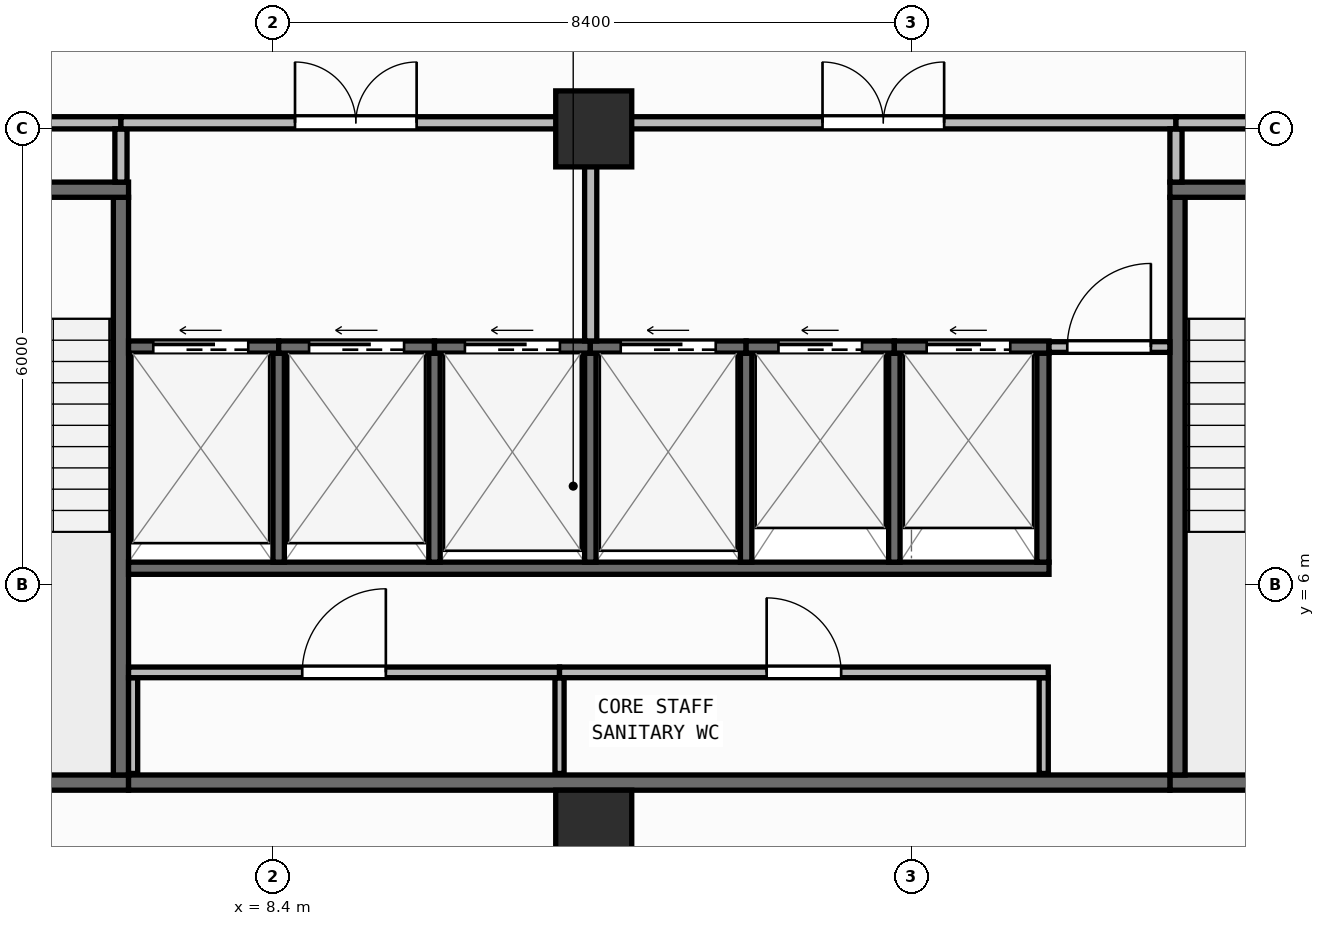
"""IFC4 building model, lengths in metres.
Left out: names, types, materials, properties, quantities, classifications, styles, units other than length and angle.
Written with IfcOpenShell. Run it as: python <this file> out.ifc"""

import sys

from ifc_helpers import new_model, si_unit, direction, frame, frame_2d, origin, origin_2d, place, context, subcontext, project, spatial, rectangle, extrude, element, fill, save


model = new_model("IFC4")
c1 = context("Model", 3, precision=1e-05, world=origin(), true_north=direction((0.0, 1.0)))
c2 = subcontext(c1, "Body", "Model", "MODEL_VIEW")
j1 = project(units=[si_unit("LENGTHUNIT", "METRE"), si_unit("PLANEANGLEUNIT", "RADIAN")], contexts=[c1])
p1 = place(None, origin())
s1 = spatial("IfcSite", under=j1, at=p1, CompositionType="ELEMENT")
p2 = place(p1, origin())
s2 = spatial("IfcBuilding", under=s1, at=p2, CompositionType="ELEMENT")
p3 = place(p2, frame((0.0, 0.0, 207.9)))
s3 = spatial("IfcBuildingStorey", under=s2, at=p3, CompositionType="ELEMENT", Elevation=207.9)
for number, where, z_axis, x_axis in (
    (1, (12.62, 2.8, 0.0), (0.0, 0.0, 1.0), (1.0, 0.0, 0.0)),
    (2, (12.62, 12.0, 0.0), (0.0, 0.0, 1.0), (1.0, 0.0, 0.0)),
):
    element("IfcColumn", number, at=place(p3, frame(where, z_axis=z_axis, x_axis=x_axis)), inside=s3, PredefinedType="COLUMN", context=c2, shape_type="SweptSolid", body=[
        extrude(rectangle(XDim=1.0, YDim=1.0, at=origin_2d()), origin(), (0.0, 0.0, 1.0), 3.95),
    ])
p4 = place(p3, frame((2.66, 0.174, 0.0), z_axis=(0.0, 0.0, 1.0), x_axis=(0.996634028439, 0.081979347142, 0.0)))
e3 = element("IfcWall", 3, at=p4, inside=s3, PredefinedType="STANDARD", context=c2, shape_type="SweptSolid", body=[
    extrude(rectangle(XDim=46.035, YDim=0.26, at=frame_2d((23.018, 0.0))), origin(), (0.0, 0.0, 1.0), 3.71),
])
p5 = place(p4, frame((21.817, 0.0, 0.9)))
e4 = element("IfcOpeningElement", 4, at=p5, cuts=e3, PredefinedType="OPENING", context=c2, shape_type="SweptSolid", body=[
    extrude(rectangle(XDim=2.4, YDim=1.65, at=frame_2d((1.2, 0.825))), frame((0.0, 0.14, 0.0), z_axis=(0.0, -1.0, 0.0), x_axis=(1.0, 0.0, 0.0)), (0.0, 0.0, 1.0), 0.28),
])
p6 = place(p3, frame((2.8, 3.4, 0.0), z_axis=(0.0, 0.0, 1.0), x_axis=(1.0, 0.0, 0.0)))
e5 = element("IfcWall", 5, at=p6, inside=s3, PredefinedType="SHEAR", context=c2, shape_type="SweptSolid", body=[
    extrude(rectangle(XDim=3.7, YDim=0.2, at=frame_2d((1.85, 0.0))), origin(), (0.0, 0.0, 1.0), 3.71),
])
p7 = place(p3, frame((6.4, 3.5, 0.0), z_axis=(0.0, 0.0, 1.0), x_axis=(0.0, 1.0, 0.0)))
e6 = element("IfcWall", 6, at=p7, inside=s3, PredefinedType="SHEAR", context=c2, shape_type="SweptSolid", body=[
    extrude(rectangle(XDim=7.6, YDim=0.2, at=frame_2d((3.8, 0.0))), origin(), (0.0, 0.0, 1.0), 3.71),
])
p8 = place(p3, frame((2.8, 11.2, 0.0), z_axis=(0.0, 0.0, 1.0), x_axis=(1.0, 0.0, 0.0)))
e7 = element("IfcWall", 7, at=p8, inside=s3, PredefinedType="SHEAR", context=c2, shape_type="SweptSolid", body=[
    extrude(rectangle(XDim=3.7, YDim=0.2, at=frame_2d((1.85, 0.0))), origin(), (0.0, 0.0, 1.0), 3.71),
])
p9 = place(p8, frame((1.2, 0.0, 0.0)))
e8 = element("IfcOpeningElement", 8, at=p9, cuts=e7, PredefinedType="OPENING", context=c2, shape_type="SweptSolid", body=[
    extrude(rectangle(XDim=1.3, YDim=2.15, at=frame_2d((0.65, 1.075))), frame((0.0, 0.11, 0.0), z_axis=(0.0, -1.0, 0.0), x_axis=(1.0, 0.0, 0.0)), (0.0, 0.0, 1.0), 0.22),
])
p10 = place(p3, frame((20.2, 3.4, 0.0), z_axis=(0.0, 0.0, 1.0), x_axis=(1.0, 0.0, 0.0)))
e9 = element("IfcWall", 9, at=p10, inside=s3, PredefinedType="SHEAR", context=c2, shape_type="SweptSolid", body=[
    extrude(rectangle(XDim=3.7, YDim=0.2, at=frame_2d((1.85, 0.0))), origin(), (0.0, 0.0, 1.0), 3.71),
])
p11 = place(p3, frame((20.3, 3.5, 0.0), z_axis=(0.0, 0.0, 1.0), x_axis=(0.0, 1.0, 0.0)))
e10 = element("IfcWall", 10, at=p11, inside=s3, PredefinedType="SHEAR", context=c2, shape_type="SweptSolid", body=[
    extrude(rectangle(XDim=7.6, YDim=0.2, at=frame_2d((3.8, 0.0))), origin(), (0.0, 0.0, 1.0), 3.71),
])
p12 = place(p3, frame((20.2, 11.2, 0.0), z_axis=(0.0, 0.0, 1.0), x_axis=(1.0, 0.0, 0.0)))
e11 = element("IfcWall", 11, at=p12, inside=s3, PredefinedType="SHEAR", context=c2, shape_type="SweptSolid", body=[
    extrude(rectangle(XDim=3.7, YDim=0.2, at=frame_2d((1.85, 0.0))), origin(), (0.0, 0.0, 1.0), 3.71),
])
p13 = place(p12, frame((1.2, 0.0, 0.0)))
e12 = element("IfcOpeningElement", 12, at=p13, cuts=e11, PredefinedType="OPENING", context=c2, shape_type="SweptSolid", body=[
    extrude(rectangle(XDim=1.3, YDim=2.15, at=frame_2d((0.65, 1.075))), frame((0.0, 0.11, 0.0), z_axis=(0.0, -1.0, 0.0), x_axis=(1.0, 0.0, 0.0)), (0.0, 0.0, 1.0), 0.22),
])
p14 = place(p3, frame((6.5, 3.4, 0.0), z_axis=(0.0, 0.0, 1.0), x_axis=(1.0, 0.0, 0.0)))
e13 = element("IfcWall", 13, at=p14, inside=s3, PredefinedType="SHEAR", context=c2, shape_type="SweptSolid", body=[
    extrude(rectangle(XDim=13.7, YDim=0.2, at=frame_2d((6.85, 0.0))), origin(), (0.0, 0.0, 1.0), 3.71),
])
p15 = place(p3, frame((6.5, 6.22, 0.0), z_axis=(0.0, 0.0, 1.0), x_axis=(1.0, 0.0, 0.0)))
e14 = element("IfcWall", 14, at=p15, inside=s3, PredefinedType="SHEAR", context=c2, shape_type="SweptSolid", body=[
    extrude(rectangle(XDim=12.11, YDim=0.16, at=frame_2d((6.055, 0.0))), origin(), (0.0, 0.0, 1.0), 3.71),
])
p16 = place(p3, frame((18.53, 6.3, 0.0), z_axis=(0.0, 0.0, 1.0), x_axis=(0.0, 1.0, 0.0)))
e15 = element("IfcWall", 15, at=p16, inside=s3, PredefinedType="SHEAR", context=c2, shape_type="SweptSolid", body=[
    extrude(rectangle(XDim=2.75, YDim=0.16, at=frame_2d((1.375, 0.0))), origin(), (0.0, 0.0, 1.0), 3.71),
])
for number, where, z_axis, x_axis in (
    (16, (8.475, 6.3, 0.0), (0.0, 0.0, 1.0), (0.0, 1.0, 0.0)),
    (17, (10.525, 6.3, 0.0), (0.0, 0.0, 1.0), (0.0, 1.0, 0.0)),
    (18, (12.575, 6.3, 0.0), (0.0, 0.0, 1.0), (0.0, 1.0, 0.0)),
    (19, (14.625, 6.3, 0.0), (0.0, 0.0, 1.0), (0.0, 1.0, 0.0)),
    (20, (16.575, 6.3, 0.0), (0.0, 0.0, 1.0), (0.0, 1.0, 0.0)),
):
    element("IfcWall", number, at=place(p3, frame(where, z_axis=z_axis, x_axis=x_axis)), inside=s3, PredefinedType="SHEAR", context=c2, shape_type="SweptSolid", body=[
        extrude(rectangle(XDim=2.75, YDim=0.15, at=frame_2d((1.375, 0.0))), origin(), (0.0, 0.0, 1.0), 3.71),
    ])
p17 = place(p3, frame((6.5, 9.13, 0.0), z_axis=(0.0, 0.0, 1.0), x_axis=(1.0, 0.0, 0.0)))
e21 = element("IfcWall", 21, at=p17, inside=s3, PredefinedType="SHEAR", context=c2, shape_type="SweptSolid", body=[
    extrude(rectangle(XDim=1.975, YDim=0.16, at=frame_2d((0.988, 0.0))), origin(), (0.0, 0.0, 1.0), 3.71),
])
p18 = place(p17, frame((0.325, 0.0, 0.0)))
e22 = element("IfcOpeningElement", 22, at=p18, cuts=e21, PredefinedType="OPENING", context=c2, shape_type="SweptSolid", body=[
    extrude(rectangle(XDim=1.25, YDim=2.15, at=frame_2d((0.625, 1.075))), frame((0.0, 0.09, 0.0), z_axis=(0.0, -1.0, 0.0), x_axis=(1.0, 0.0, 0.0)), (0.0, 0.0, 1.0), 0.18),
])
p19 = place(p3, frame((8.475, 9.13, 0.0), z_axis=(0.0, 0.0, 1.0), x_axis=(1.0, 0.0, 0.0)))
e23 = element("IfcWall", 23, at=p19, inside=s3, PredefinedType="SHEAR", context=c2, shape_type="SweptSolid", body=[
    extrude(rectangle(XDim=2.05, YDim=0.16, at=frame_2d((1.025, 0.0))), origin(), (0.0, 0.0, 1.0), 3.71),
])
p20 = place(p19, frame((0.4, 0.0, 0.0)))
e24 = element("IfcOpeningElement", 24, at=p20, cuts=e23, PredefinedType="OPENING", context=c2, shape_type="SweptSolid", body=[
    extrude(rectangle(XDim=1.25, YDim=2.15, at=frame_2d((0.625, 1.075))), frame((0.0, 0.09, 0.0), z_axis=(0.0, -1.0, 0.0), x_axis=(1.0, 0.0, 0.0)), (0.0, 0.0, 1.0), 0.18),
])
p21 = place(p3, frame((10.525, 9.13, 0.0), z_axis=(0.0, 0.0, 1.0), x_axis=(1.0, 0.0, 0.0)))
e25 = element("IfcWall", 25, at=p21, inside=s3, PredefinedType="SHEAR", context=c2, shape_type="SweptSolid", body=[
    extrude(rectangle(XDim=2.05, YDim=0.16, at=frame_2d((1.025, 0.0))), origin(), (0.0, 0.0, 1.0), 3.71),
])
p22 = place(p21, frame((0.4, 0.0, 0.0)))
e26 = element("IfcOpeningElement", 26, at=p22, cuts=e25, PredefinedType="OPENING", context=c2, shape_type="SweptSolid", body=[
    extrude(rectangle(XDim=1.25, YDim=2.15, at=frame_2d((0.625, 1.075))), frame((0.0, 0.09, 0.0), z_axis=(0.0, -1.0, 0.0), x_axis=(1.0, 0.0, 0.0)), (0.0, 0.0, 1.0), 0.18),
])
p23 = place(p3, frame((12.575, 9.13, 0.0), z_axis=(0.0, 0.0, 1.0), x_axis=(1.0, 0.0, 0.0)))
e27 = element("IfcWall", 27, at=p23, inside=s3, PredefinedType="SHEAR", context=c2, shape_type="SweptSolid", body=[
    extrude(rectangle(XDim=2.05, YDim=0.16, at=frame_2d((1.025, 0.0))), origin(), (0.0, 0.0, 1.0), 3.71),
])
p24 = place(p23, frame((0.4, 0.0, 0.0)))
e28 = element("IfcOpeningElement", 28, at=p24, cuts=e27, PredefinedType="OPENING", context=c2, shape_type="SweptSolid", body=[
    extrude(rectangle(XDim=1.25, YDim=2.15, at=frame_2d((0.625, 1.075))), frame((0.0, 0.09, 0.0), z_axis=(0.0, -1.0, 0.0), x_axis=(1.0, 0.0, 0.0)), (0.0, 0.0, 1.0), 0.18),
])
p25 = place(p3, frame((14.625, 9.13, 0.0), z_axis=(0.0, 0.0, 1.0), x_axis=(1.0, 0.0, 0.0)))
e29 = element("IfcWall", 29, at=p25, inside=s3, PredefinedType="SHEAR", context=c2, shape_type="SweptSolid", body=[
    extrude(rectangle(XDim=1.95, YDim=0.16, at=frame_2d((0.975, 0.0))), origin(), (0.0, 0.0, 1.0), 3.71),
])
p26 = place(p25, frame((0.425, 0.0, 0.0)))
e30 = element("IfcOpeningElement", 30, at=p26, cuts=e29, PredefinedType="OPENING", context=c2, shape_type="SweptSolid", body=[
    extrude(rectangle(XDim=1.1, YDim=2.15, at=frame_2d((0.55, 1.075))), frame((0.0, 0.09, 0.0), z_axis=(0.0, -1.0, 0.0), x_axis=(1.0, 0.0, 0.0)), (0.0, 0.0, 1.0), 0.18),
])
p27 = place(p3, frame((16.575, 9.13, 0.0), z_axis=(0.0, 0.0, 1.0), x_axis=(1.0, 0.0, 0.0)))
e31 = element("IfcWall", 31, at=p27, inside=s3, PredefinedType="SHEAR", context=c2, shape_type="SweptSolid", body=[
    extrude(rectangle(XDim=2.035, YDim=0.16, at=frame_2d((1.018, 0.0))), origin(), (0.0, 0.0, 1.0), 3.71),
])
p28 = place(p27, frame((0.425, 0.0, 0.0)))
e32 = element("IfcOpeningElement", 32, at=p28, cuts=e31, PredefinedType="OPENING", context=c2, shape_type="SweptSolid", body=[
    extrude(rectangle(XDim=1.1, YDim=2.15, at=frame_2d((0.55, 1.075))), frame((0.0, 0.09, 0.0), z_axis=(0.0, -1.0, 0.0), x_axis=(1.0, 0.0, 0.0)), (0.0, 0.0, 1.0), 0.18),
])
for number, where, z_axis, x_axis in (
    (33, (6.56, 3.52, 0.0), (0.0, 0.0, 1.0), (0.0, 1.0, 0.0)),
    (34, (12.17, 3.52, 0.0), (0.0, 0.0, 1.0), (0.0, 1.0, 0.0)),
    (35, (18.54, 3.52, 0.0), (0.0, 0.0, 1.0), (0.0, 1.0, 0.0)),
):
    element("IfcWall", number, at=place(p3, frame(where, z_axis=z_axis, x_axis=x_axis)), inside=s3, PredefinedType="PARTITIONING", context=c2, shape_type="SweptSolid", body=[
        extrude(rectangle(XDim=1.26, YDim=0.12, at=frame_2d((0.63, 0.0))), origin(), (0.0, 0.0, 1.0), 3.71),
    ])
p29 = place(p3, frame((6.5, 4.85, 0.0), z_axis=(0.0, 0.0, 1.0), x_axis=(1.0, 0.0, 0.0)))
e36 = element("IfcWall", 36, at=p29, inside=s3, PredefinedType="PARTITIONING", context=c2, shape_type="SweptSolid", body=[
    extrude(rectangle(XDim=5.67, YDim=0.14, at=frame_2d((2.835, 0.0))), origin(), (0.0, 0.0, 1.0), 3.71),
])
p30 = place(p29, frame((2.285, 0.0, 0.0)))
e37 = element("IfcOpeningElement", 37, at=p30, cuts=e36, PredefinedType="OPENING", context=c2, shape_type="SweptSolid", body=[
    extrude(rectangle(XDim=1.1, YDim=2.1, at=frame_2d((0.55, 1.05))), frame((0.0, 0.08, 0.0), z_axis=(0.0, -1.0, 0.0), x_axis=(1.0, 0.0, 0.0)), (0.0, 0.0, 1.0), 0.16),
])
p31 = place(p3, frame((12.17, 4.85, 0.0), z_axis=(0.0, 0.0, 1.0), x_axis=(1.0, 0.0, 0.0)))
e38 = element("IfcWall", 38, at=p31, inside=s3, PredefinedType="PARTITIONING", context=c2, shape_type="SweptSolid", body=[
    extrude(rectangle(XDim=6.43, YDim=0.14, at=frame_2d((3.215, 0.0))), origin(), (0.0, 0.0, 1.0), 3.71),
])
p32 = place(p31, frame((2.725, 0.0, 0.0)))
e39 = element("IfcOpeningElement", 39, at=p32, cuts=e38, PredefinedType="OPENING", context=c2, shape_type="SweptSolid", body=[
    extrude(rectangle(XDim=0.98, YDim=2.1, at=frame_2d((0.49, 1.05))), frame((0.0, 0.08, 0.0), z_axis=(0.0, -1.0, 0.0), x_axis=(1.0, 0.0, 0.0)), (0.0, 0.0, 1.0), 0.16),
])
p33 = place(p3, frame((18.61, 9.13, 0.0), z_axis=(0.0, 0.0, 1.0), x_axis=(1.0, 0.0, 0.0)))
e40 = element("IfcWall", 40, at=p33, inside=s3, PredefinedType="PARTITIONING", context=c2, shape_type="SweptSolid", body=[
    extrude(rectangle(XDim=1.59, YDim=0.14, at=frame_2d((0.795, 0.0))), origin(), (0.0, 0.0, 1.0), 3.71),
])
p34 = place(p33, frame((0.24, 0.0, 0.0)))
e41 = element("IfcOpeningElement", 41, at=p34, cuts=e40, PredefinedType="OPENING", context=c2, shape_type="SweptSolid", body=[
    extrude(rectangle(XDim=1.1, YDim=2.1, at=frame_2d((0.55, 1.05))), frame((0.0, 0.08, 0.0), z_axis=(0.0, -1.0, 0.0), x_axis=(1.0, 0.0, 0.0)), (0.0, 0.0, 1.0), 0.16),
])
p35 = place(p3, frame((2.8, 12.08, 0.0), z_axis=(0.0, 0.0, 1.0), x_axis=(1.0, 0.0, 0.0)))
e42 = element("IfcWall", 42, at=p35, inside=s3, PredefinedType="PARTITIONING", context=c2, shape_type="SweptSolid", body=[
    extrude(rectangle(XDim=3.6, YDim=0.16, at=frame_2d((1.8, 0.0))), origin(), (0.0, 0.0, 1.0), 3.152),
])
p36 = place(p35, frame((1.0, 0.0, 0.0)))
e43 = element("IfcOpeningElement", 43, at=p36, cuts=e42, PredefinedType="OPENING", context=c2, shape_type="SweptSolid", body=[
    extrude(rectangle(XDim=1.6, YDim=2.05, at=frame_2d((0.8, 1.025))), frame((0.0, 0.09, 0.0), z_axis=(0.0, -1.0, 0.0), x_axis=(1.0, 0.0, 0.0)), (0.0, 0.0, 1.0), 0.18),
])
p37 = place(p3, frame((6.4, 11.3, 0.0), z_axis=(0.0, 0.0, 1.0), x_axis=(0.0, 1.0, 0.0)))
e44 = element("IfcWall", 44, at=p37, inside=s3, PredefinedType="PARTITIONING", context=c2, shape_type="SweptSolid", body=[
    extrude(rectangle(XDim=0.7, YDim=0.16, at=frame_2d((0.35, 0.0))), origin(), (0.0, 0.0, 1.0), 3.71),
])
p38 = place(p3, frame((6.4, 12.08, 0.0), z_axis=(0.0, 0.0, 1.0), x_axis=(1.0, 0.0, 0.0)))
e45 = element("IfcWall", 45, at=p38, inside=s3, PredefinedType="PARTITIONING", context=c2, shape_type="SweptSolid", body=[
    extrude(rectangle(XDim=6.18, YDim=0.16, at=frame_2d((3.09, 0.0))), origin(), (0.0, 0.0, 1.0), 3.152),
])
p39 = place(p38, frame((2.29, 0.0, 0.0)))
e46 = element("IfcOpeningElement", 46, at=p39, cuts=e45, PredefinedType="OPENING", context=c2, shape_type="SweptSolid", body=[
    extrude(rectangle(XDim=1.6, YDim=2.05, at=frame_2d((0.8, 1.025))), frame((0.0, 0.09, 0.0), z_axis=(0.0, -1.0, 0.0), x_axis=(1.0, 0.0, 0.0)), (0.0, 0.0, 1.0), 0.18),
])
p40 = place(p3, frame((12.58, 9.21, 0.0), z_axis=(0.0, 0.0, 1.0), x_axis=(0.0, 1.0, 0.0)))
e47 = element("IfcWall", 47, at=p40, inside=s3, PredefinedType="PARTITIONING", context=c2, shape_type="SweptSolid", body=[
    extrude(rectangle(XDim=2.79, YDim=0.16, at=frame_2d((1.395, 0.0))), origin(), (0.0, 0.0, 1.0), 3.71),
])
p41 = place(p3, frame((12.58, 12.08, 0.0), z_axis=(0.0, 0.0, 1.0), x_axis=(1.0, 0.0, 0.0)))
e48 = element("IfcWall", 48, at=p41, inside=s3, PredefinedType="PARTITIONING", context=c2, shape_type="SweptSolid", body=[
    extrude(rectangle(XDim=7.7, YDim=0.16, at=frame_2d((3.85, 0.0))), origin(), (0.0, 0.0, 1.0), 3.152),
])
p42 = place(p41, frame((3.05, 0.0, 0.0)))
e49 = element("IfcOpeningElement", 49, at=p42, cuts=e48, PredefinedType="OPENING", context=c2, shape_type="SweptSolid", body=[
    extrude(rectangle(XDim=1.6, YDim=2.05, at=frame_2d((0.8, 1.025))), frame((0.0, 0.09, 0.0), z_axis=(0.0, -1.0, 0.0), x_axis=(1.0, 0.0, 0.0)), (0.0, 0.0, 1.0), 0.18),
])
p43 = place(p3, frame((20.28, 11.3, 0.0), z_axis=(0.0, 0.0, 1.0), x_axis=(0.0, 1.0, 0.0)))
e50 = element("IfcWall", 50, at=p43, inside=s3, PredefinedType="PARTITIONING", context=c2, shape_type="SweptSolid", body=[
    extrude(rectangle(XDim=0.7, YDim=0.16, at=frame_2d((0.35, 0.0))), origin(), (0.0, 0.0, 1.0), 3.71),
])
p44 = place(p3, frame((20.28, 12.08, 0.0), z_axis=(0.0, 0.0, 1.0), x_axis=(1.0, 0.0, 0.0)))
e51 = element("IfcWall", 51, at=p44, inside=s3, PredefinedType="PARTITIONING", context=c2, shape_type="SweptSolid", body=[
    extrude(rectangle(XDim=3.62, YDim=0.16, at=frame_2d((1.81, 0.0))), origin(), (0.0, 0.0, 1.0), 3.152),
])
p45 = place(p44, frame((1.01, 0.0, 0.0)))
e52 = element("IfcOpeningElement", 52, at=p45, cuts=e51, PredefinedType="OPENING", context=c2, shape_type="SweptSolid", body=[
    extrude(rectangle(XDim=1.6, YDim=2.05, at=frame_2d((0.8, 1.025))), frame((0.0, 0.09, 0.0), z_axis=(0.0, -1.0, 0.0), x_axis=(1.0, 0.0, 0.0)), (0.0, 0.0, 1.0), 0.18),
])
p46 = place(p18, origin())
e53 = element("IfcDoor", 53, at=p46, inside=s3, OperationType="SLIDING_TO_LEFT", PredefinedType="DOOR", context=c2, shape_type="SweptSolid", body=[
    extrude(rectangle(XDim=1.25, YDim=2.15, at=frame_2d((0.625, 1.075))), frame((0.0, 0.025, 0.0), z_axis=(0.0, -1.0, 0.0), x_axis=(1.0, 0.0, 0.0)), (0.0, 0.0, 1.0), 0.05),
])
fill(e22, e53)
p47 = place(p20, origin())
e54 = element("IfcDoor", 54, at=p47, inside=s3, OperationType="SLIDING_TO_LEFT", PredefinedType="DOOR", context=c2, shape_type="SweptSolid", body=[
    extrude(rectangle(XDim=1.25, YDim=2.15, at=frame_2d((0.625, 1.075))), frame((0.0, 0.025, 0.0), z_axis=(0.0, -1.0, 0.0), x_axis=(1.0, 0.0, 0.0)), (0.0, 0.0, 1.0), 0.05),
])
fill(e24, e54)
p48 = place(p22, origin())
e55 = element("IfcDoor", 55, at=p48, inside=s3, OperationType="SLIDING_TO_LEFT", PredefinedType="DOOR", context=c2, shape_type="SweptSolid", body=[
    extrude(rectangle(XDim=1.25, YDim=2.15, at=frame_2d((0.625, 1.075))), frame((0.0, 0.025, 0.0), z_axis=(0.0, -1.0, 0.0), x_axis=(1.0, 0.0, 0.0)), (0.0, 0.0, 1.0), 0.05),
])
fill(e26, e55)
p49 = place(p24, origin())
e56 = element("IfcDoor", 56, at=p49, inside=s3, OperationType="SLIDING_TO_LEFT", PredefinedType="DOOR", context=c2, shape_type="SweptSolid", body=[
    extrude(rectangle(XDim=1.25, YDim=2.15, at=frame_2d((0.625, 1.075))), frame((0.0, 0.025, 0.0), z_axis=(0.0, -1.0, 0.0), x_axis=(1.0, 0.0, 0.0)), (0.0, 0.0, 1.0), 0.05),
])
fill(e28, e56)
p50 = place(p26, origin())
e57 = element("IfcDoor", 57, at=p50, inside=s3, OperationType="SLIDING_TO_LEFT", PredefinedType="DOOR", context=c2, shape_type="SweptSolid", body=[
    extrude(rectangle(XDim=1.1, YDim=2.15, at=frame_2d((0.55, 1.075))), frame((0.0, 0.025, 0.0), z_axis=(0.0, -1.0, 0.0), x_axis=(1.0, 0.0, 0.0)), (0.0, 0.0, 1.0), 0.05),
])
fill(e30, e57)
p51 = place(p28, origin())
e58 = element("IfcDoor", 58, at=p51, inside=s3, OperationType="SLIDING_TO_LEFT", PredefinedType="DOOR", context=c2, shape_type="SweptSolid", body=[
    extrude(rectangle(XDim=1.1, YDim=2.15, at=frame_2d((0.55, 1.075))), frame((0.0, 0.025, 0.0), z_axis=(0.0, -1.0, 0.0), x_axis=(1.0, 0.0, 0.0)), (0.0, 0.0, 1.0), 0.05),
])
fill(e32, e58)
p52 = place(p30, origin())
e59 = element("IfcDoor", 59, at=p52, inside=s3, OperationType="SINGLE_SWING_RIGHT", PredefinedType="DOOR", context=c2, shape_type="SweptSolid", body=[
    extrude(rectangle(XDim=1.1, YDim=2.1, at=frame_2d((0.55, 1.05))), frame((0.0, 0.025, 0.0), z_axis=(0.0, -1.0, 0.0), x_axis=(1.0, 0.0, 0.0)), (0.0, 0.0, 1.0), 0.05),
])
fill(e37, e59)
p53 = place(p32, origin())
e60 = element("IfcDoor", 60, at=p53, inside=s3, OperationType="SINGLE_SWING_LEFT", PredefinedType="DOOR", context=c2, shape_type="SweptSolid", body=[
    extrude(rectangle(XDim=0.98, YDim=2.1, at=frame_2d((0.49, 1.05))), frame((0.0, 0.025, 0.0), z_axis=(0.0, -1.0, 0.0), x_axis=(1.0, 0.0, 0.0)), (0.0, 0.0, 1.0), 0.05),
])
fill(e39, e60)
p54 = place(p34, origin())
e61 = element("IfcDoor", 61, at=p54, inside=s3, OperationType="SINGLE_SWING_RIGHT", PredefinedType="DOOR", context=c2, shape_type="SweptSolid", body=[
    extrude(rectangle(XDim=1.1, YDim=2.1, at=frame_2d((0.55, 1.05))), frame((0.0, 0.025, 0.0), z_axis=(0.0, -1.0, 0.0), x_axis=(1.0, 0.0, 0.0)), (0.0, 0.0, 1.0), 0.05),
])
fill(e41, e61)
p55 = place(p39, origin())
e62 = element("IfcDoor", 62, at=p55, inside=s3, OperationType="DOUBLE_DOOR_SINGLE_SWING", PredefinedType="DOOR", context=c2, shape_type="SweptSolid", body=[
    extrude(rectangle(XDim=1.6, YDim=2.05, at=frame_2d((0.8, 1.025))), frame((0.0, 0.025, 0.0), z_axis=(0.0, -1.0, 0.0), x_axis=(1.0, 0.0, 0.0)), (0.0, 0.0, 1.0), 0.05),
])
fill(e46, e62)
p56 = place(p42, origin())
e63 = element("IfcDoor", 63, at=p56, inside=s3, OperationType="DOUBLE_DOOR_SINGLE_SWING", PredefinedType="DOOR", context=c2, shape_type="SweptSolid", body=[
    extrude(rectangle(XDim=1.6, YDim=2.05, at=frame_2d((0.8, 1.025))), frame((0.0, 0.025, 0.0), z_axis=(0.0, -1.0, 0.0), x_axis=(1.0, 0.0, 0.0)), (0.0, 0.0, 1.0), 0.05),
])
fill(e49, e63)
save(model, sys.argv[1])
